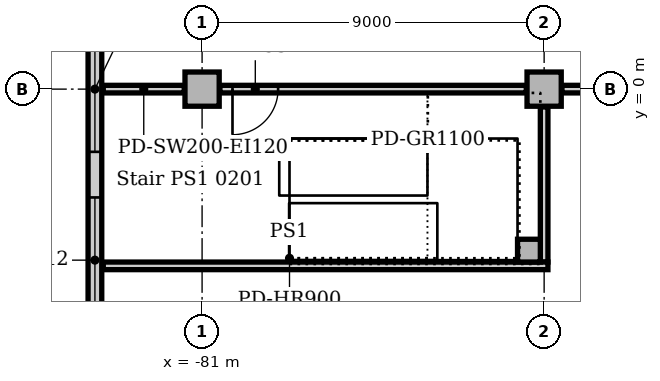
"""IFC4 building model, lengths in metres.
Left out: names, types, materials, properties, quantities, classifications, styles, units other than length and angle.
Written with IfcOpenShell. Run it as: python <this file> out.ifc"""

import sys

from ifc_helpers import new_model, si_unit, direction, frame, frame_2d, origin, origin_2d, place, context, subcontext, project, spatial, rectangle, extrude, element, fill, save


model = new_model("IFC4")
c1 = context("Model", 3, precision=1e-05, world=origin(), true_north=direction((0.0, 1.0)))
c2 = subcontext(c1, "Body", "Model", "MODEL_VIEW")
j1 = project(units=[si_unit("LENGTHUNIT", "METRE"), si_unit("PLANEANGLEUNIT", "RADIAN")], contexts=[c1])
p1 = place(None, origin())
s1 = spatial("IfcSite", under=j1, at=p1, CompositionType="ELEMENT")
p2 = place(p1, origin())
s2 = spatial("IfcBuilding", under=s1, at=p2, CompositionType="ELEMENT")
p3 = place(p2, frame((0.0, 0.0, 11.0)))
s3 = spatial("IfcBuildingStorey", under=s2, at=p3, CompositionType="ELEMENT", Elevation=11.0)
for number, where, z_axis, x_axis in (
    (1, (-81.0, 0.0, 0.0), (0.0, 0.0, 1.0), (1.0, 0.0, 0.0)),
    (2, (-72.0, 0.0, 0.0), (0.0, 0.0, 1.0), (1.0, 0.0, 0.0)),
):
    element("IfcColumn", number, at=place(p3, frame(where, z_axis=z_axis, x_axis=x_axis)), inside=s3, PredefinedType="COLUMN", context=c2, shape_type="SweptSolid", body=[
        extrude(rectangle(XDim=0.9, YDim=0.9, at=origin_2d()), origin(), (0.0, 0.0, 1.0), 4.7),
    ])
p4 = place(p3, frame((-83.82, 54.0, 0.0), z_axis=(0.0, 0.0, 1.0), x_axis=(0.0, -1.0, 0.0)))
e3 = element("IfcWall", 3, at=p4, inside=s3, PredefinedType="STANDARD", context=c2, shape_type="SweptSolid", body=[
    extrude(rectangle(XDim=63.0, YDim=0.36, at=frame_2d((31.5, 0.0))), origin(), (0.0, 0.0, 1.0), 4.7),
])
p5 = place(p4, frame((2.85, 0.0, 0.9)))
e4 = element("IfcOpeningElement", 4, at=p5, cuts=e3, PredefinedType="OPENING", context=c2, shape_type="SweptSolid", body=[
    extrude(rectangle(XDim=3.3, YDim=2.4, at=frame_2d((1.65, 1.2))), frame((0.0, 0.19, 0.0), z_axis=(0.0, -1.0, 0.0), x_axis=(1.0, 0.0, 0.0)), (0.0, 0.0, 1.0), 0.38),
])
p6 = place(p4, frame((7.35, 0.0, 0.9)))
e5 = element("IfcOpeningElement", 5, at=p6, cuts=e3, PredefinedType="OPENING", context=c2, shape_type="SweptSolid", body=[
    extrude(rectangle(XDim=3.3, YDim=2.4, at=frame_2d((1.65, 1.2))), frame((0.0, 0.19, 0.0), z_axis=(0.0, -1.0, 0.0), x_axis=(1.0, 0.0, 0.0)), (0.0, 0.0, 1.0), 0.38),
])
p7 = place(p4, frame((11.85, 0.0, 0.9)))
e6 = element("IfcOpeningElement", 6, at=p7, cuts=e3, PredefinedType="OPENING", context=c2, shape_type="SweptSolid", body=[
    extrude(rectangle(XDim=3.3, YDim=2.4, at=frame_2d((1.65, 1.2))), frame((0.0, 0.19, 0.0), z_axis=(0.0, -1.0, 0.0), x_axis=(1.0, 0.0, 0.0)), (0.0, 0.0, 1.0), 0.38),
])
p8 = place(p4, frame((16.35, 0.0, 0.9)))
e7 = element("IfcOpeningElement", 7, at=p8, cuts=e3, PredefinedType="OPENING", context=c2, shape_type="SweptSolid", body=[
    extrude(rectangle(XDim=3.3, YDim=2.4, at=frame_2d((1.65, 1.2))), frame((0.0, 0.19, 0.0), z_axis=(0.0, -1.0, 0.0), x_axis=(1.0, 0.0, 0.0)), (0.0, 0.0, 1.0), 0.38),
])
p9 = place(p4, frame((20.85, 0.0, 0.9)))
e8 = element("IfcOpeningElement", 8, at=p9, cuts=e3, PredefinedType="OPENING", context=c2, shape_type="SweptSolid", body=[
    extrude(rectangle(XDim=3.3, YDim=2.4, at=frame_2d((1.65, 1.2))), frame((0.0, 0.19, 0.0), z_axis=(0.0, -1.0, 0.0), x_axis=(1.0, 0.0, 0.0)), (0.0, 0.0, 1.0), 0.38),
])
p10 = place(p4, frame((25.35, 0.0, 0.9)))
e9 = element("IfcOpeningElement", 9, at=p10, cuts=e3, PredefinedType="OPENING", context=c2, shape_type="SweptSolid", body=[
    extrude(rectangle(XDim=3.3, YDim=2.4, at=frame_2d((1.65, 1.2))), frame((0.0, 0.19, 0.0), z_axis=(0.0, -1.0, 0.0), x_axis=(1.0, 0.0, 0.0)), (0.0, 0.0, 1.0), 0.38),
])
p11 = place(p4, frame((29.85, 0.0, 0.9)))
e10 = element("IfcOpeningElement", 10, at=p11, cuts=e3, PredefinedType="OPENING", context=c2, shape_type="SweptSolid", body=[
    extrude(rectangle(XDim=3.3, YDim=2.4, at=frame_2d((1.65, 1.2))), frame((0.0, 0.19, 0.0), z_axis=(0.0, -1.0, 0.0), x_axis=(1.0, 0.0, 0.0)), (0.0, 0.0, 1.0), 0.38),
])
p12 = place(p4, frame((34.35, 0.0, 0.9)))
e11 = element("IfcOpeningElement", 11, at=p12, cuts=e3, PredefinedType="OPENING", context=c2, shape_type="SweptSolid", body=[
    extrude(rectangle(XDim=3.3, YDim=2.4, at=frame_2d((1.65, 1.2))), frame((0.0, 0.19, 0.0), z_axis=(0.0, -1.0, 0.0), x_axis=(1.0, 0.0, 0.0)), (0.0, 0.0, 1.0), 0.38),
])
p13 = place(p4, frame((38.85, 0.0, 0.9)))
e12 = element("IfcOpeningElement", 12, at=p13, cuts=e3, PredefinedType="OPENING", context=c2, shape_type="SweptSolid", body=[
    extrude(rectangle(XDim=3.3, YDim=2.4, at=frame_2d((1.65, 1.2))), frame((0.0, 0.19, 0.0), z_axis=(0.0, -1.0, 0.0), x_axis=(1.0, 0.0, 0.0)), (0.0, 0.0, 1.0), 0.38),
])
p14 = place(p4, frame((43.35, 0.0, 0.9)))
e13 = element("IfcOpeningElement", 13, at=p14, cuts=e3, PredefinedType="OPENING", context=c2, shape_type="SweptSolid", body=[
    extrude(rectangle(XDim=3.3, YDim=2.4, at=frame_2d((1.65, 1.2))), frame((0.0, 0.19, 0.0), z_axis=(0.0, -1.0, 0.0), x_axis=(1.0, 0.0, 0.0)), (0.0, 0.0, 1.0), 0.38),
])
p15 = place(p4, frame((47.85, 0.0, 0.9)))
e14 = element("IfcOpeningElement", 14, at=p15, cuts=e3, PredefinedType="OPENING", context=c2, shape_type="SweptSolid", body=[
    extrude(rectangle(XDim=3.3, YDim=2.4, at=frame_2d((1.65, 1.2))), frame((0.0, 0.19, 0.0), z_axis=(0.0, -1.0, 0.0), x_axis=(1.0, 0.0, 0.0)), (0.0, 0.0, 1.0), 0.38),
])
p16 = place(p4, frame((52.35, 0.0, 0.9)))
e15 = element("IfcOpeningElement", 15, at=p16, cuts=e3, PredefinedType="OPENING", context=c2, shape_type="SweptSolid", body=[
    extrude(rectangle(XDim=3.3, YDim=2.4, at=frame_2d((1.65, 1.2))), frame((0.0, 0.19, 0.0), z_axis=(0.0, -1.0, 0.0), x_axis=(1.0, 0.0, 0.0)), (0.0, 0.0, 1.0), 0.38),
])
p17 = place(p4, frame((56.85, 0.0, 0.9)))
e16 = element("IfcOpeningElement", 16, at=p17, cuts=e3, PredefinedType="OPENING", context=c2, shape_type="SweptSolid", body=[
    extrude(rectangle(XDim=3.3, YDim=2.4, at=frame_2d((1.65, 1.2))), frame((0.0, 0.19, 0.0), z_axis=(0.0, -1.0, 0.0), x_axis=(1.0, 0.0, 0.0)), (0.0, 0.0, 1.0), 0.38),
])
p18 = place(p3, frame((-72.4, -4.25, 0.0), z_axis=(0.0, 0.0, 1.0), x_axis=(1.0, 0.0, 0.0)))
e17 = element("IfcColumn", 17, at=p18, inside=s3, PredefinedType="COLUMN", context=c2, shape_type="SweptSolid", body=[
    extrude(rectangle(XDim=0.6, YDim=0.6, at=origin_2d()), origin(), (0.0, 0.0, 1.0), 5.0),
])
p19 = place(p3, frame((-83.6, 0.0, 0.0), z_axis=(0.0, 0.0, 1.0), x_axis=(1.0, 0.0, 0.0)))
e18 = element("IfcWall", 18, at=p19, inside=s3, PredefinedType="SOLIDWALL", context=c2, shape_type="SweptSolid", body=[
    extrude(rectangle(XDim=2.13, YDim=0.2, at=frame_2d((1.065, 0.0))), origin(), (0.0, 0.0, 1.0), 4.7),
])
p20 = place(p3, frame((-80.53, 0.0, 0.0), z_axis=(0.0, 0.0, 1.0), x_axis=(1.0, 0.0, 0.0)))
e19 = element("IfcWall", 19, at=p20, inside=s3, PredefinedType="SOLIDWALL", context=c2, shape_type="SweptSolid", body=[
    extrude(rectangle(XDim=8.06, YDim=0.2, at=frame_2d((4.03, 0.0))), origin(), (0.0, 0.0, 1.0), 4.7),
])
p21 = place(p20, frame((0.33, 0.0, 0.0)))
e20 = element("IfcOpeningElement", 20, at=p21, cuts=e19, PredefinedType="OPENING", context=c2, shape_type="SweptSolid", body=[
    extrude(rectangle(XDim=1.2, YDim=2.1, at=frame_2d((0.6, 1.05))), frame((0.0, 0.11, 0.0), z_axis=(0.0, -1.0, 0.0), x_axis=(1.0, 0.0, 0.0)), (0.0, 0.0, 1.0), 0.22),
])
p22 = place(p3, frame((-72.0, -4.55, 0.0), z_axis=(0.0, 0.0, 1.0), x_axis=(0.0, 1.0, 0.0)))
e21 = element("IfcWall", 21, at=p22, inside=s3, PredefinedType="SOLIDWALL", context=c2, shape_type="SweptSolid", body=[
    extrude(rectangle(XDim=4.08, YDim=0.2, at=frame_2d((2.04, 0.0))), origin(), (0.0, 0.0, 1.0), 4.7),
])
p23 = place(p3, frame((-83.6, -4.65, 0.0), z_axis=(0.0, 0.0, 1.0), x_axis=(1.0, 0.0, 0.0)))
e22 = element("IfcWall", 22, at=p23, inside=s3, PredefinedType="SOLIDWALL", context=c2, shape_type="SweptSolid", body=[
    extrude(rectangle(XDim=11.7, YDim=0.2, at=frame_2d((5.85, 0.0))), origin(), (0.0, 0.0, 1.0), 4.7),
])
p24 = place(p3, frame((-71.53, 0.0, 0.0), z_axis=(0.0, 0.0, 1.0), x_axis=(1.0, 0.0, 0.0)))
e23 = element("IfcWall", 23, at=p24, inside=s3, PredefinedType="PARTITIONING", context=c2, shape_type="SweptSolid", body=[
    extrude(rectangle(XDim=8.53, YDim=0.2, at=frame_2d((4.265, 0.0))), origin(), (0.0, 0.0, 1.0), 4.7),
])
p25 = place(p24, frame((3.53, 0.0, 0.0)))
e24 = element("IfcOpeningElement", 24, at=p25, cuts=e23, PredefinedType="OPENING", context=c2, shape_type="SweptSolid", body=[
    extrude(rectangle(XDim=1.0, YDim=2.1, at=frame_2d((0.5, 1.05))), frame((0.0, 0.11, 0.0), z_axis=(0.0, -1.0, 0.0), x_axis=(1.0, 0.0, 0.0)), (0.0, 0.0, 1.0), 0.22),
])
p26 = place(p16, origin())
e25 = element("IfcWindow", 25, at=p26, inside=s3, PartitioningType="SINGLE_PANEL", PredefinedType="WINDOW", context=c2, shape_type="SweptSolid", body=[
    extrude(rectangle(XDim=3.3, YDim=2.4, at=frame_2d((1.65, 1.2))), frame((0.0, 0.13, 0.0), z_axis=(0.0, -1.0, 0.0), x_axis=(1.0, 0.0, 0.0)), (0.0, 0.0, 1.0), 0.06),
])
fill(e15, e25)
p27 = place(p17, origin())
e26 = element("IfcWindow", 26, at=p27, inside=s3, PartitioningType="SINGLE_PANEL", PredefinedType="WINDOW", context=c2, shape_type="SweptSolid", body=[
    extrude(rectangle(XDim=3.3, YDim=2.4, at=frame_2d((1.65, 1.2))), frame((0.0, 0.13, 0.0), z_axis=(0.0, -1.0, 0.0), x_axis=(1.0, 0.0, 0.0)), (0.0, 0.0, 1.0), 0.06),
])
fill(e16, e26)
p28 = place(p21, frame((1.2, 0.0, 0.0), z_axis=(0.0, 0.0, 1.0), x_axis=(-1.0, 0.0, 0.0)))
e27 = element("IfcDoor", 27, at=p28, inside=s3, OperationType="SINGLE_SWING_RIGHT", PredefinedType="DOOR", context=c2, shape_type="SweptSolid", body=[
    extrude(rectangle(XDim=1.2, YDim=2.1, at=frame_2d((0.6, 1.05))), frame((0.0, 0.025, 0.0), z_axis=(0.0, -1.0, 0.0), x_axis=(1.0, 0.0, 0.0)), (0.0, 0.0, 1.0), 0.05),
])
fill(e20, e27)
save(model, sys.argv[1])
